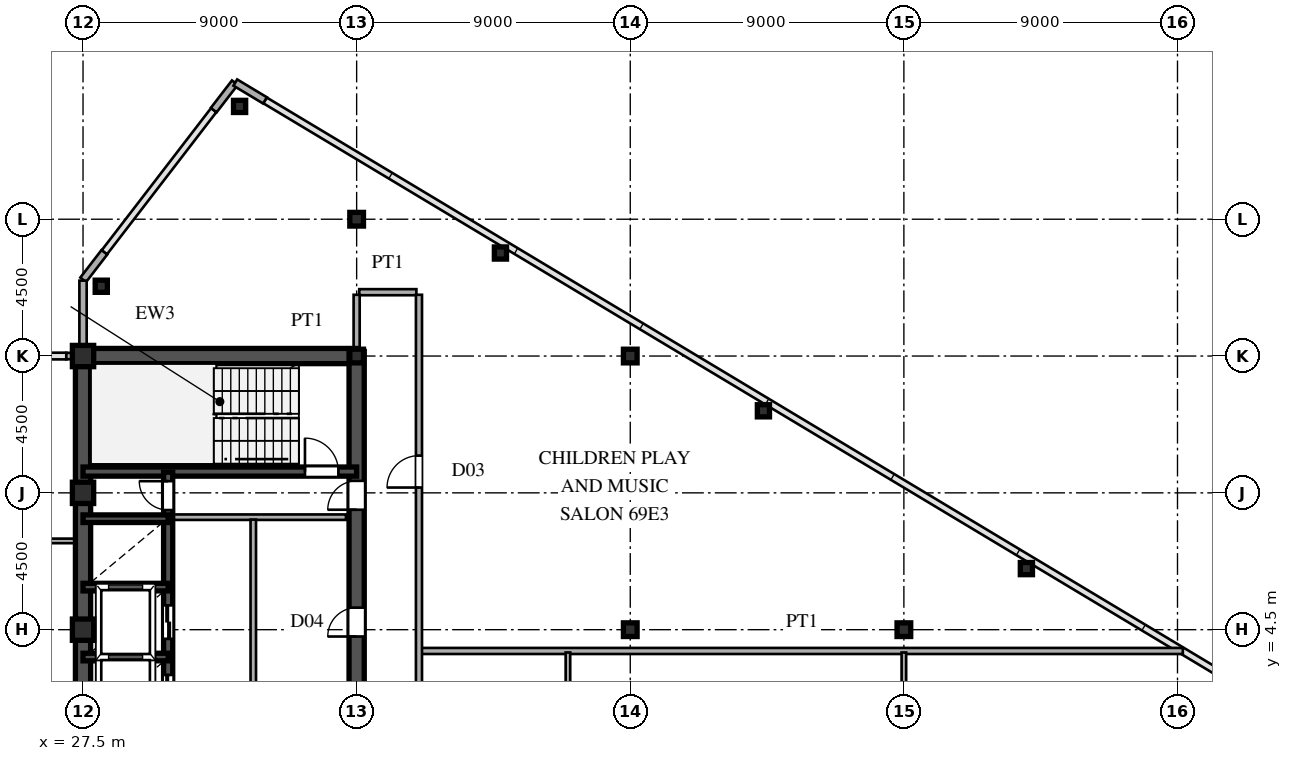
"""IFC4 building model, lengths in metres.
Left out: names, types, materials, properties, quantities, classifications, styles, units other than length and angle.
Written with IfcOpenShell. Run it as: python <this file> out.ifc"""

import sys

from ifc_helpers import new_model, si_unit, direction, frame, frame_2d, origin, origin_2d, place, context, subcontext, project, spatial, rectangle, hollow_rectangle, i_section, extrude, source, transform, mapped, element, fill, save


model = new_model("IFC4")
c1 = context("Model", 3, precision=1e-05, world=origin(), true_north=direction((0.0, 1.0)))
c2 = subcontext(c1, "Body", "Model", "MODEL_VIEW")
j1 = project(units=[si_unit("LENGTHUNIT", "METRE"), si_unit("PLANEANGLEUNIT", "RADIAN")], contexts=[c1])
p1 = place(None, origin())
s1 = spatial("IfcSite", under=j1, at=p1, CompositionType="ELEMENT")
p2 = place(p1, origin())
s2 = spatial("IfcBuilding", under=s1, at=p2, CompositionType="ELEMENT")
p3 = place(p2, frame((0.0, 0.0, 261.9)))
s3 = spatial("IfcBuildingStorey", under=s2, at=p3, CompositionType="ELEMENT", Elevation=261.9)
m1 = source(origin(), c2, "Body", "SweptSolid", [
    extrude(hollow_rectangle(XDim=0.7, YDim=0.7, WallThickness=0.03, at=origin_2d()), origin(), (0.0, 0.0, 1.0), 3.75),
])
for number, where, z_axis, x_axis in (
    (1, (27.5, 4.5, 0.0), (0.0, 0.0, 1.0), (1.0, 0.0, 0.0)),
    (2, (27.5, 9.0, 0.0), (0.0, 0.0, 1.0), (1.0, 0.0, 0.0)),
    (3, (27.5, 13.5, 0.0), (0.0, 0.0, 1.0), (1.0, 0.0, 0.0)),
):
    element("IfcColumn", number, at=place(p3, frame(where, z_axis=z_axis, x_axis=x_axis)), inside=s3, PredefinedType="COLUMN", context=c2, shape_type="MappedRepresentation", body=[
        mapped(m1, transform((0.0, 0.0, 0.0), scale=1.0)),
    ])
m2 = source(origin(), c2, "Body", "SweptSolid", [
    extrude(i_section(OverallWidth=0.45, OverallDepth=0.45, WebThickness=0.016, FlangeThickness=0.025, at=origin_2d()), origin(), (0.0, 0.0, 1.0), 3.75),
])
for number, where, z_axis, x_axis in (
    (4, (36.5, 13.5, 0.0), (0.0, 0.0, 1.0), (1.0, 0.0, 0.0)),
    (5, (36.5, 18.0, 0.0), (0.0, 0.0, 1.0), (1.0, 0.0, 0.0)),
    (6, (45.5, 4.5, 0.0), (0.0, 0.0, 1.0), (1.0, 0.0, 0.0)),
    (7, (45.5, 13.5, 0.0), (0.0, 0.0, 1.0), (1.0, 0.0, 0.0)),
    (8, (54.5, 4.5, 0.0), (0.0, 0.0, 1.0), (1.0, 0.0, 0.0)),
):
    element("IfcColumn", number, at=place(p3, frame(where, z_axis=z_axis, x_axis=x_axis)), inside=s3, PredefinedType="COLUMN", context=c2, shape_type="MappedRepresentation", body=[
        mapped(m2, transform((0.0, 0.0, 0.0), scale=1.0)),
    ])
m3 = source(origin(), c2, "Body", "SweptSolid", [
    extrude(hollow_rectangle(XDim=0.4, YDim=0.4, WallThickness=0.016, at=origin_2d()), origin(), (0.0, 0.0, 1.0), 3.75),
])
for number, where, z_axis, x_axis in (
    (9, (32.65, 21.71, 0.0), (0.0, 0.0, 1.0), (1.0, 0.0, 0.0)),
    (10, (28.1, 15.796, 0.0), (0.0, 0.0, 1.0), (1.0, 0.0, 0.0)),
    (11, (41.23, 16.889, 0.0), (0.0, 0.0, 1.0), (1.0, 0.0, 0.0)),
    (12, (49.88, 11.699, 0.0), (0.0, 0.0, 1.0), (1.0, 0.0, 0.0)),
    (13, (58.53, 6.509, 0.0), (0.0, 0.0, 1.0), (1.0, 0.0, 0.0)),
):
    element("IfcColumn", number, at=place(p3, frame(where, z_axis=z_axis, x_axis=x_axis)), inside=s3, PredefinedType="COLUMN", context=c2, shape_type="MappedRepresentation", body=[
        mapped(m3, transform((0.0, 0.0, 0.0), scale=1.0)),
    ])
for number, where, z_axis, x_axis in (
    (14, (33.486, 21.908, 0.0), (0.0, 0.0, 1.0), (-0.857, 0.515, 0.0)),
    (15, (32.494, 22.492, 0.0), (0.0, 0.0, 1.0), (-0.61, -0.793, 0.0)),
    (16, (28.201, 16.912, 0.0), (0.0, 0.0, 1.0), (-0.61, -0.793, 0.0)),
):
    element("IfcWall", number, at=place(p3, frame(where, z_axis=z_axis, x_axis=x_axis)), inside=s3, PredefinedType="SOLIDWALL", context=c2, shape_type="SweptSolid", body=[
        extrude(rectangle(XDim=1.14, YDim=0.24, at=frame_2d((0.57, 0.0))), origin(), (0.0, 0.0, 1.0), 3.53),
    ])
p4 = place(p3, frame((27.5, 13.755, 0.0), z_axis=(0.0, 0.0, 1.0), x_axis=(0.0, 1.0, 0.0)))
e17 = element("IfcWall", 17, at=p4, inside=s3, PredefinedType="SOLIDWALL", context=c2, shape_type="SweptSolid", body=[
    extrude(rectangle(XDim=0.62, YDim=0.24, at=frame_2d((0.31, 0.0))), origin(), (0.0, 0.0, 1.0), 3.03),
])
p5 = place(p3, frame((27.5, 14.375, 0.0), z_axis=(0.0, 0.0, 1.0), x_axis=(0.0, 1.0, 0.0)))
e18 = element("IfcWall", 18, at=p5, inside=s3, PredefinedType="SOLIDWALL", context=c2, shape_type="SweptSolid", body=[
    extrude(rectangle(XDim=1.605, YDim=0.24, at=frame_2d((0.803, 0.0))), origin(), (0.0, 0.0, 1.0), 3.53),
])
p6 = place(p3, frame((26.95, 13.5, 0.0), z_axis=(0.0, 0.0, 1.0), x_axis=(1.0, 0.0, 0.0)))
e19 = element("IfcWall", 19, at=p6, inside=s3, PredefinedType="SOLIDWALL", context=c2, shape_type="SweptSolid", body=[
    extrude(rectangle(XDim=0.54, YDim=0.21, at=frame_2d((0.27, 0.0))), origin(), (0.0, 0.0, 1.0), 3.03),
])
p7 = place(p3, frame((27.5, 1.3, 0.0), z_axis=(0.0, 0.0, 1.0), x_axis=(0.0, 1.0, 0.0)))
e20 = element("IfcWall", 20, at=p7, inside=s3, PredefinedType="SHEAR", context=c2, shape_type="SweptSolid", body=[
    extrude(rectangle(XDim=12.2, YDim=0.5, at=frame_2d((6.1, 0.0))), origin(), (0.0, 0.0, 1.0), 3.53),
])
p8 = place(p3, frame((27.5, 13.5, 0.0), z_axis=(0.0, 0.0, 1.0), x_axis=(1.0, 0.0, 0.0)))
e21 = element("IfcWall", 21, at=p8, inside=s3, PredefinedType="SHEAR", context=c2, shape_type="SweptSolid", body=[
    extrude(rectangle(XDim=9.0, YDim=0.5, at=frame_2d((4.5, 0.0))), origin(), (0.0, 0.0, 1.0), 3.53),
])
p9 = place(p3, frame((36.5, 8.2, 0.0), z_axis=(0.0, 0.0, 1.0), x_axis=(0.0, 1.0, 0.0)))
e22 = element("IfcWall", 22, at=p9, inside=s3, PredefinedType="SHEAR", context=c2, shape_type="SweptSolid", body=[
    extrude(rectangle(XDim=5.45, YDim=0.5, at=frame_2d((2.725, 0.0))), origin(), (0.0, 0.0, 1.0), 3.53),
])
p10 = place(p9, frame((0.245, 0.0, 0.0)))
e23 = element("IfcOpeningElement", 23, at=p10, cuts=e22, PredefinedType="OPENING", context=c2, shape_type="SweptSolid", body=[
    extrude(rectangle(XDim=0.95, YDim=2.15, at=frame_2d((0.475, 1.075))), frame((0.0, 0.26, 0.0), z_axis=(0.0, -1.0, 0.0), x_axis=(1.0, 0.0, 0.0)), (0.0, 0.0, 1.0), 0.52),
])
p11 = place(p3, frame((36.5, 1.3, 0.0), z_axis=(0.0, 0.0, 1.0), x_axis=(0.0, 1.0, 0.0)))
e24 = element("IfcWall", 24, at=p11, inside=s3, PredefinedType="SHEAR", context=c2, shape_type="SweptSolid", body=[
    extrude(rectangle(XDim=6.9, YDim=0.5, at=frame_2d((3.45, 0.0))), origin(), (0.0, 0.0, 1.0), 3.53),
])
p12 = place(p11, frame((2.975, 0.0, 0.0)))
e25 = element("IfcOpeningElement", 25, at=p12, cuts=e24, PredefinedType="OPENING", context=c2, shape_type="SweptSolid", body=[
    extrude(rectangle(XDim=0.95, YDim=2.15, at=frame_2d((0.475, 1.075))), frame((0.0, 0.26, 0.0), z_axis=(0.0, -1.0, 0.0), x_axis=(1.0, 0.0, 0.0)), (0.0, 0.0, 1.0), 0.52),
])
p13 = place(p3, frame((27.5, 9.7, 0.0), z_axis=(0.0, 0.0, 1.0), x_axis=(1.0, 0.0, 0.0)))
e26 = element("IfcWall", 26, at=p13, inside=s3, PredefinedType="SHEAR", context=c2, shape_type="SweptSolid", body=[
    extrude(rectangle(XDim=9.0, YDim=0.3, at=frame_2d((4.5, 0.0))), origin(), (0.0, 0.0, 1.0), 3.53),
])
p14 = place(p13, frame((7.3, 0.0, 0.0)))
e27 = element("IfcOpeningElement", 27, at=p14, cuts=e26, PredefinedType="OPENING", context=c2, shape_type="SweptSolid", body=[
    extrude(rectangle(XDim=1.1, YDim=2.2, at=frame_2d((0.55, 1.1))), frame((0.0, 0.16, 0.0), z_axis=(0.0, -1.0, 0.0), x_axis=(1.0, 0.0, 0.0)), (0.0, 0.0, 1.0), 0.32),
])
for number, where, z_axis, x_axis in (
    (28, (27.5, 3.6, 0.0), (0.0, 0.0, 1.0), (1.0, 0.0, 0.0)),
    (29, (27.5, 5.9, 0.0), (0.0, 0.0, 1.0), (1.0, 0.0, 0.0)),
    (30, (27.5, 8.15, 0.0), (0.0, 0.0, 1.0), (1.0, 0.0, 0.0)),
):
    element("IfcWall", number, at=place(p3, frame(where, z_axis=z_axis, x_axis=x_axis)), inside=s3, PredefinedType="SHEAR", context=c2, shape_type="SweptSolid", body=[
        extrude(rectangle(XDim=2.8, YDim=0.25, at=frame_2d((1.4, 0.0))), origin(), (0.0, 0.0, 1.0), 3.53),
    ])
p15 = place(p3, frame((30.3, 1.32, 0.0), z_axis=(0.0, 0.0, 1.0), x_axis=(0.0, 1.0, 0.0)))
e31 = element("IfcWall", 31, at=p15, inside=s3, PredefinedType="SHEAR", context=c2, shape_type="SweptSolid", body=[
    extrude(rectangle(XDim=2.28, YDim=0.3, at=frame_2d((1.14, 0.0))), origin(), (0.0, 0.0, 1.0), 3.53),
])
p16 = place(p15, frame((0.59, 0.0, 0.0)))
e32 = element("IfcOpeningElement", 32, at=p16, cuts=e31, PredefinedType="OPENING", context=c2, shape_type="SweptSolid", body=[
    extrude(rectangle(XDim=1.1, YDim=2.2, at=frame_2d((0.55, 1.1))), frame((0.0, 0.16, 0.0), z_axis=(0.0, -1.0, 0.0), x_axis=(1.0, 0.0, 0.0)), (0.0, 0.0, 1.0), 0.32),
])
p17 = place(p3, frame((30.3, 3.6, 0.0), z_axis=(0.0, 0.0, 1.0), x_axis=(0.0, 1.0, 0.0)))
e33 = element("IfcWall", 33, at=p17, inside=s3, PredefinedType="SHEAR", context=c2, shape_type="SweptSolid", body=[
    extrude(rectangle(XDim=2.3, YDim=0.3, at=frame_2d((1.15, 0.0))), origin(), (0.0, 0.0, 1.0), 3.53),
])
p18 = place(p17, frame((0.6, 0.0, 0.0)))
e34 = element("IfcOpeningElement", 34, at=p18, cuts=e33, PredefinedType="OPENING", context=c2, shape_type="SweptSolid", body=[
    extrude(rectangle(XDim=1.1, YDim=2.2, at=frame_2d((0.55, 1.1))), frame((0.0, 0.16, 0.0), z_axis=(0.0, -1.0, 0.0), x_axis=(1.0, 0.0, 0.0)), (0.0, 0.0, 1.0), 0.32),
])
p19 = place(p3, frame((30.3, 5.9, 0.0), z_axis=(0.0, 0.0, 1.0), x_axis=(0.0, 1.0, 0.0)))
e35 = element("IfcWall", 35, at=p19, inside=s3, PredefinedType="SHEAR", context=c2, shape_type="SweptSolid", body=[
    extrude(rectangle(XDim=2.25, YDim=0.3, at=frame_2d((1.125, 0.0))), origin(), (0.0, 0.0, 1.0), 3.53),
])
p20 = place(p3, frame((30.3, 8.15, 0.0), z_axis=(0.0, 0.0, 1.0), x_axis=(0.0, 1.0, 0.0)))
e36 = element("IfcWall", 36, at=p20, inside=s3, PredefinedType="SHEAR", context=c2, shape_type="SweptSolid", body=[
    extrude(rectangle(XDim=1.53, YDim=0.3, at=frame_2d((0.765, 0.0))), origin(), (0.0, 0.0, 1.0), 3.53),
])
p21 = place(p20, frame((0.285, 0.0, 0.0)))
e37 = element("IfcOpeningElement", 37, at=p21, cuts=e36, PredefinedType="OPENING", context=c2, shape_type="SweptSolid", body=[
    extrude(rectangle(XDim=0.95, YDim=2.15, at=frame_2d((0.475, 1.075))), frame((0.0, 0.16, 0.0), z_axis=(0.0, -1.0, 0.0), x_axis=(1.0, 0.0, 0.0)), (0.0, 0.0, 1.0), 0.32),
])
p22 = place(p3, frame((30.45, 8.2, 0.0), z_axis=(0.0, 0.0, 1.0), x_axis=(1.0, 0.0, 0.0)))
e38 = element("IfcWall", 38, at=p22, inside=s3, PredefinedType="PARTITIONING", context=c2, shape_type="SweptSolid", body=[
    extrude(rectangle(XDim=5.7, YDim=0.18, at=frame_2d((2.85, 0.0))), origin(), (0.0, 0.0, 1.0), 3.53),
])
p23 = place(p3, frame((33.1, 1.38, 0.0), z_axis=(0.0, 0.0, 1.0), x_axis=(0.0, 1.0, 0.0)))
e39 = element("IfcWall", 39, at=p23, inside=s3, PredefinedType="PARTITIONING", context=c2, shape_type="SweptSolid", body=[
    extrude(rectangle(XDim=6.74, YDim=0.18, at=frame_2d((3.37, 0.0))), origin(), (0.0, 0.0, 1.0), 3.53),
])
p24 = place(p3, frame((38.63, 3.8, 0.0), z_axis=(0.0, 0.0, 1.0), x_axis=(1.0, 0.0, 0.0)))
e40 = element("IfcWall", 40, at=p24, inside=s3, PredefinedType="PARTITIONING", context=c2, shape_type="SweptSolid", body=[
    extrude(rectangle(XDim=25.046, YDim=0.2, at=frame_2d((12.523, 0.0))), origin(), (0.0, 0.0, 1.0), 3.53),
])
p25 = place(p3, frame((4.585, 7.42, 0.0), z_axis=(0.0, 0.0, 1.0), x_axis=(1.0, 0.0, 0.0)))
e41 = element("IfcWall", 41, at=p25, inside=s3, PredefinedType="PARTITIONING", context=c2, shape_type="SweptSolid", body=[
    extrude(rectangle(XDim=22.66, YDim=0.15, at=frame_2d((11.33, 0.0))), origin(), (0.0, 0.0, 1.0), 3.53),
])
p26 = place(p25, frame((3.94, 0.0, 0.0)))
e42 = element("IfcOpeningElement", 42, at=p26, cuts=e41, PredefinedType="OPENING", context=c2, shape_type="SweptSolid", body=[
    extrude(rectangle(XDim=0.95, YDim=2.15, at=frame_2d((0.475, 1.075))), frame((0.0, 0.085, 0.0), z_axis=(0.0, -1.0, 0.0), x_axis=(1.0, 0.0, 0.0)), (0.0, 0.0, 1.0), 0.17),
])
p27 = place(p25, frame((11.94, 0.0, 0.0)))
e43 = element("IfcOpeningElement", 43, at=p27, cuts=e41, PredefinedType="OPENING", context=c2, shape_type="SweptSolid", body=[
    extrude(rectangle(XDim=0.95, YDim=2.15, at=frame_2d((0.475, 1.075))), frame((0.0, 0.085, 0.0), z_axis=(0.0, -1.0, 0.0), x_axis=(1.0, 0.0, 0.0)), (0.0, 0.0, 1.0), 0.17),
])
p28 = place(p25, frame((18.94, 0.0, 0.0)))
e44 = element("IfcOpeningElement", 44, at=p28, cuts=e41, PredefinedType="OPENING", context=c2, shape_type="SweptSolid", body=[
    extrude(rectangle(XDim=0.95, YDim=2.15, at=frame_2d((0.475, 1.075))), frame((0.0, 0.085, 0.0), z_axis=(0.0, -1.0, 0.0), x_axis=(1.0, 0.0, 0.0)), (0.0, 0.0, 1.0), 0.17),
])
p29 = place(p3, frame((36.585, 15.6, 0.0), z_axis=(0.0, 0.0, 1.0), x_axis=(1.0, 0.0, 0.0)))
e45 = element("IfcWall", 45, at=p29, inside=s3, PredefinedType="PARTITIONING", context=c2, shape_type="SweptSolid", body=[
    extrude(rectangle(XDim=1.88, YDim=0.2, at=frame_2d((0.94, 0.0))), origin(), (0.0, 0.0, 1.0), 3.53),
])
p30 = place(p3, frame((36.5, 13.755, 0.0), z_axis=(0.0, 0.0, 1.0), x_axis=(0.0, 1.0, 0.0)))
e46 = element("IfcWall", 46, at=p30, inside=s3, PredefinedType="PARTITIONING", context=c2, shape_type="SweptSolid", body=[
    extrude(rectangle(XDim=1.76, YDim=0.2, at=frame_2d((0.88, 0.0))), origin(), (0.0, 0.0, 1.0), 2.93),
])
p31 = place(p3, frame((38.55, -15.515, 0.0), z_axis=(0.0, 0.0, 1.0), x_axis=(0.0, 1.0, 0.0)))
e47 = element("IfcWall", 47, at=p31, inside=s3, PredefinedType="PARTITIONING", context=c2, shape_type="SweptSolid", body=[
    extrude(rectangle(XDim=31.03, YDim=0.2, at=frame_2d((15.515, 0.0))), origin(), (0.0, 0.0, 1.0), 3.53),
])
p32 = place(p31, frame((2.39, 0.0, 0.0)))
e48 = element("IfcOpeningElement", 48, at=p32, cuts=e47, PredefinedType="OPENING", context=c2, shape_type="SweptSolid", body=[
    extrude(rectangle(XDim=1.05, YDim=2.25, at=frame_2d((0.525, 1.125))), frame((0.0, 0.11, 0.0), z_axis=(0.0, -1.0, 0.0), x_axis=(1.0, 0.0, 0.0)), (0.0, 0.0, 1.0), 0.22),
])
p33 = place(p31, frame((11.889, 0.0, 0.0)))
e49 = element("IfcOpeningElement", 49, at=p33, cuts=e47, PredefinedType="OPENING", context=c2, shape_type="SweptSolid", body=[
    extrude(rectangle(XDim=1.05, YDim=2.25, at=frame_2d((0.525, 1.125))), frame((0.0, 0.11, 0.0), z_axis=(0.0, -1.0, 0.0), x_axis=(1.0, 0.0, 0.0)), (0.0, 0.0, 1.0), 0.22),
])
p34 = place(p31, frame((24.69, 0.0, 0.0)))
e50 = element("IfcOpeningElement", 50, at=p34, cuts=e47, PredefinedType="OPENING", context=c2, shape_type="SweptSolid", body=[
    extrude(rectangle(XDim=1.05, YDim=2.25, at=frame_2d((0.525, 1.125))), frame((0.0, 0.11, 0.0), z_axis=(0.0, -1.0, 0.0), x_axis=(1.0, 0.0, 0.0)), (0.0, 0.0, 1.0), 0.22),
])
p35 = place(p3, frame((43.45, -0.168, 0.0), z_axis=(0.0, 0.0, 1.0), x_axis=(0.0, 1.0, 0.0)))
e51 = element("IfcWall", 51, at=p35, inside=s3, PredefinedType="PARTITIONING", context=c2, shape_type="SweptSolid", body=[
    extrude(rectangle(XDim=3.918, YDim=0.15, at=frame_2d((1.959, 0.0))), origin(), (0.0, 0.0, 1.0), 3.53),
])
p36 = place(p3, frame((54.5, -9.335, 0.0), z_axis=(0.0, 0.0, 1.0), x_axis=(0.0, 1.0, 0.0)))
e52 = element("IfcWall", 52, at=p36, inside=s3, PredefinedType="PARTITIONING", context=c2, shape_type="SweptSolid", body=[
    extrude(rectangle(XDim=13.085, YDim=0.15, at=frame_2d((6.542, 0.0))), origin(), (0.0, 0.0, 1.0), 2.93),
])
p37 = place(p36, frame((5.96, 0.0, 0.0)))
e53 = element("IfcOpeningElement", 53, at=p37, cuts=e52, PredefinedType="OPENING", context=c2, shape_type="SweptSolid", body=[
    extrude(rectangle(XDim=0.95, YDim=2.15, at=frame_2d((0.475, 1.075))), frame((0.0, 0.085, 0.0), z_axis=(0.0, -1.0, 0.0), x_axis=(1.0, 0.0, 0.0)), (0.0, 0.0, 1.0), 0.17),
])
p38 = place(p36, frame((1.643, 0.0, 0.0)))
e54 = element("IfcOpeningElement", 54, at=p38, cuts=e52, PredefinedType="OPENING", context=c2, shape_type="SweptSolid", body=[
    extrude(rectangle(XDim=0.95, YDim=2.15, at=frame_2d((0.475, 1.075))), frame((0.0, 0.085, 0.0), z_axis=(0.0, -1.0, 0.0), x_axis=(1.0, 0.0, 0.0)), (0.0, 0.0, 1.0), 0.17),
])
p39 = place(p36, frame((10.427, 0.0, 0.0)))
e55 = element("IfcOpeningElement", 55, at=p39, cuts=e52, PredefinedType="OPENING", context=c2, shape_type="SweptSolid", body=[
    extrude(rectangle(XDim=0.95, YDim=2.15, at=frame_2d((0.475, 1.075))), frame((0.0, 0.085, 0.0), z_axis=(0.0, -1.0, 0.0), x_axis=(1.0, 0.0, 0.0)), (0.0, 0.0, 1.0), 0.17),
])
m4 = source(origin(), c2, "Body", "SweptSolid", [
    extrude(rectangle(XDim=0.95, YDim=2.15, at=frame_2d((0.475, 1.075))), frame((0.0, 0.025, 0.0), z_axis=(0.0, -1.0, 0.0), x_axis=(1.0, 0.0, 0.0)), (0.0, 0.0, 1.0), 0.05),
])
p40 = place(p10, origin())
e56 = element("IfcDoor", 56, at=p40, inside=s3, OperationType="SINGLE_SWING_LEFT", PredefinedType="DOOR", context=c2, shape_type="MappedRepresentation", body=[
    mapped(m4, transform((0.0, 0.0, 0.0), scale=1.0)),
])
fill(e23, e56)
p41 = place(p12, origin())
e57 = element("IfcDoor", 57, at=p41, inside=s3, OperationType="SINGLE_SWING_LEFT", PredefinedType="DOOR", context=c2, shape_type="MappedRepresentation", body=[
    mapped(m4, transform((0.0, 0.0, 0.0), scale=1.0)),
])
fill(e25, e57)
m5 = source(origin(), c2, "Body", "SweptSolid", [
    extrude(rectangle(XDim=1.1, YDim=2.2, at=frame_2d((0.55, 1.1))), frame((0.0, 0.025, 0.0), z_axis=(0.0, -1.0, 0.0), x_axis=(1.0, 0.0, 0.0)), (0.0, 0.0, 1.0), 0.05),
])
p42 = place(p14, origin())
e58 = element("IfcDoor", 58, at=p42, inside=s3, OperationType="SINGLE_SWING_LEFT", PredefinedType="DOOR", context=c2, shape_type="MappedRepresentation", body=[
    mapped(m5, transform((0.0, 0.0, 0.0), scale=1.0)),
])
fill(e27, e58)
m6 = source(origin(), c2, "Body", "SweptSolid", [
    extrude(rectangle(XDim=1.1, YDim=2.2, at=frame_2d((0.55, 1.1))), frame((0.0, 0.025, 0.0), z_axis=(0.0, -1.0, 0.0), x_axis=(1.0, 0.0, 0.0)), (0.0, 0.0, 1.0), 0.05),
])
p43 = place(p16, origin())
e59 = element("IfcDoor", 59, at=p43, inside=s3, OperationType="DOUBLE_DOOR_SLIDING", PredefinedType="DOOR", context=c2, shape_type="MappedRepresentation", body=[
    mapped(m6, transform((0.0, 0.0, 0.0), scale=1.0)),
])
fill(e32, e59)
p44 = place(p18, origin())
e60 = element("IfcDoor", 60, at=p44, inside=s3, OperationType="DOUBLE_DOOR_SLIDING", PredefinedType="DOOR", context=c2, shape_type="MappedRepresentation", body=[
    mapped(m6, transform((0.0, 0.0, 0.0), scale=1.0)),
])
fill(e34, e60)
p45 = place(p21, origin())
e61 = element("IfcDoor", 61, at=p45, inside=s3, OperationType="SINGLE_SWING_RIGHT", PredefinedType="DOOR", context=c2, shape_type="MappedRepresentation", body=[
    mapped(m4, transform((0.0, 0.0, 0.0), scale=1.0)),
])
fill(e37, e61)
m7 = source(origin(), c2, "Body", "SweptSolid", [
    extrude(rectangle(XDim=1.05, YDim=2.25, at=frame_2d((0.525, 1.125))), frame((0.0, 0.025, 0.0), z_axis=(0.0, -1.0, 0.0), x_axis=(1.0, 0.0, 0.0)), (0.0, 0.0, 1.0), 0.05),
])
p46 = place(p34, origin())
e62 = element("IfcDoor", 62, at=p46, inside=s3, OperationType="SINGLE_SWING_LEFT", PredefinedType="DOOR", context=c2, shape_type="MappedRepresentation", body=[
    mapped(m7, transform((0.0, 0.0, 0.0), scale=1.0)),
])
fill(e50, e62)
save(model, sys.argv[1])
